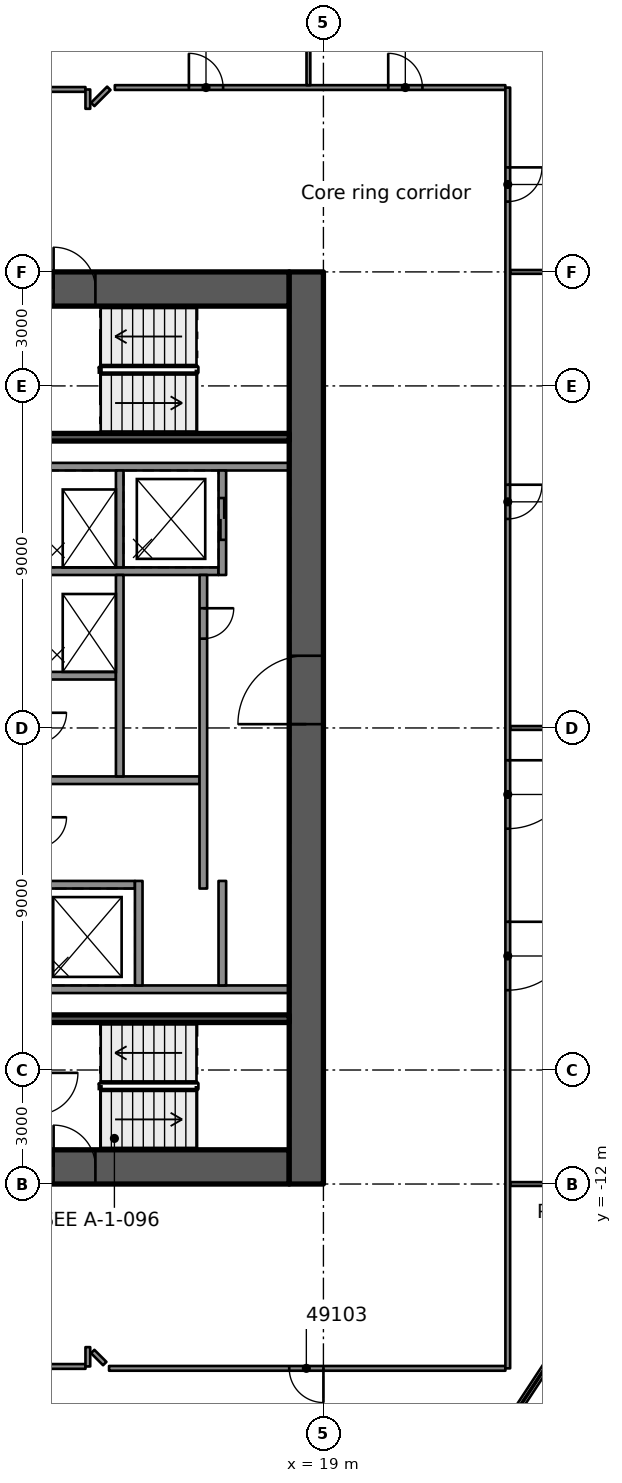
"""IFC4 building model, lengths in metres.
Left out: names, types, materials, properties, quantities, classifications, styles, units other than length and angle.
Written with IfcOpenShell. Run it as: python <this file> out.ifc"""

import sys

from ifc_helpers import new_model, si_unit, direction, frame, frame_2d, origin, place, context, subcontext, project, spatial, rectangle, extrude, element, fill, save


model = new_model("IFC4")
c1 = context("Model", 3, precision=1e-05, world=origin(), true_north=direction((0.0, 1.0)))
c2 = subcontext(c1, "Body", "Model", "MODEL_VIEW")
j1 = project(units=[si_unit("LENGTHUNIT", "METRE"), si_unit("PLANEANGLEUNIT", "RADIAN")], contexts=[c1])
p1 = place(None, origin())
s1 = spatial("IfcSite", under=j1, at=p1, CompositionType="ELEMENT")
p2 = place(p1, origin())
s2 = spatial("IfcBuilding", under=s1, at=p2, CompositionType="ELEMENT")
p3 = place(p2, frame((0.0, 0.0, 246.0)))
s3 = spatial("IfcBuildingStorey", under=s2, at=p3, CompositionType="ELEMENT", Elevation=246.0)
p4 = place(p3, frame((8.9, 11.55, 0.0), z_axis=(0.0, 0.0, 1.0), x_axis=(1.0, 0.0, 0.0)))
e1 = element("IfcWall", 1, at=p4, inside=s3, PredefinedType="SHEAR", context=c2, shape_type="SweptSolid", body=[
    extrude(rectangle(XDim=9.2, YDim=0.9, at=frame_2d((4.6, 0.0))), origin(), (0.0, 0.0, 1.0), 3.5),
])
p5 = place(p4, frame((3.0, 0.0, 0.0)))
e2 = element("IfcOpeningElement", 2, at=p5, cuts=e1, PredefinedType="OPENING", context=c2, shape_type="SweptSolid", body=[
    extrude(rectangle(XDim=1.1, YDim=2.1, at=frame_2d((0.55, 1.05))), frame((0.0, 0.46, 0.0), z_axis=(0.0, -1.0, 0.0), x_axis=(1.0, 0.0, 0.0)), (0.0, 0.0, 1.0), 0.92),
])
p6 = place(p4, frame((0.77, 0.0, 0.0)))
e3 = element("IfcOpeningElement", 3, at=p6, cuts=e1, PredefinedType="OPENING", context=c2, shape_type="SweptSolid", body=[
    extrude(rectangle(XDim=0.9, YDim=2.1, at=frame_2d((0.45, 1.05))), frame((0.0, 0.46, 0.0), z_axis=(0.0, -1.0, 0.0), x_axis=(1.0, 0.0, 0.0)), (0.0, 0.0, 1.0), 0.92),
])
p7 = place(p3, frame((8.9, -11.55, 0.0), z_axis=(0.0, 0.0, 1.0), x_axis=(1.0, 0.0, 0.0)))
e4 = element("IfcWall", 4, at=p7, inside=s3, PredefinedType="SHEAR", context=c2, shape_type="SweptSolid", body=[
    extrude(rectangle(XDim=9.2, YDim=0.9, at=frame_2d((4.6, 0.0))), origin(), (0.0, 0.0, 1.0), 3.5),
])
p8 = place(p7, frame((3.0, 0.0, 0.0)))
e5 = element("IfcOpeningElement", 5, at=p8, cuts=e4, PredefinedType="OPENING", context=c2, shape_type="SweptSolid", body=[
    extrude(rectangle(XDim=1.1, YDim=2.1, at=frame_2d((0.55, 1.05))), frame((0.0, 0.46, 0.0), z_axis=(0.0, -1.0, 0.0), x_axis=(1.0, 0.0, 0.0)), (0.0, 0.0, 1.0), 0.92),
])
p9 = place(p3, frame((18.55, -12.0, 0.0), z_axis=(0.0, 0.0, 1.0), x_axis=(0.0, 1.0, 0.0)))
e6 = element("IfcWall", 6, at=p9, inside=s3, PredefinedType="SHEAR", context=c2, shape_type="SweptSolid", body=[
    extrude(rectangle(XDim=24.0, YDim=0.9, at=frame_2d((12.0, 0.0))), origin(), (0.0, 0.0, 1.0), 3.5),
])
p10 = place(p9, frame((12.1, 0.0, 0.0)))
e7 = element("IfcOpeningElement", 7, at=p10, cuts=e6, PredefinedType="OPENING", context=c2, shape_type="SweptSolid", body=[
    extrude(rectangle(XDim=1.8, YDim=2.1, at=frame_2d((0.9, 1.05))), frame((0.0, 0.46, 0.0), z_axis=(0.0, -1.0, 0.0), x_axis=(1.0, 0.0, 0.0)), (0.0, 0.0, 1.0), 0.92),
])
for number, where, z_axis, x_axis in (
    (8, (11.54, -6.875, 0.0), (0.0, 0.0, 1.0), (1.0, 0.0, 0.0)),
    (9, (11.54, 6.875, 0.0), (0.0, 0.0, 1.0), (1.0, 0.0, 0.0)),
):
    element("IfcWall", number, at=place(p3, frame(where, z_axis=z_axis, x_axis=x_axis)), inside=s3, PredefinedType="SOLIDWALL", context=c2, shape_type="SweptSolid", body=[
        extrude(rectangle(XDim=6.56, YDim=0.2, at=frame_2d((3.28, 0.0))), origin(), (0.0, 0.0, 1.0), 3.08),
    ])
p11 = place(p3, frame((11.54, 4.125, 0.0), z_axis=(0.0, 0.0, 1.0), x_axis=(1.0, 0.0, 0.0)))
e10 = element("IfcWall", 10, at=p11, inside=s3, PredefinedType="SOLIDWALL", context=c2, shape_type="SweptSolid", body=[
    extrude(rectangle(XDim=4.7, YDim=0.2, at=frame_2d((2.35, 0.0))), origin(), (0.0, 0.0, 1.0), 3.08),
])
p12 = place(p3, frame((11.54, 1.375, 0.0), z_axis=(0.0, 0.0, 1.0), x_axis=(1.0, 0.0, 0.0)))
e11 = element("IfcWall", 11, at=p12, inside=s3, PredefinedType="SOLIDWALL", context=c2, shape_type="SweptSolid", body=[
    extrude(rectangle(XDim=2.0, YDim=0.2, at=frame_2d((1.0, 0.0))), origin(), (0.0, 0.0, 1.0), 3.08),
])
p13 = place(p3, frame((11.54, -1.375, 0.0), z_axis=(0.0, 0.0, 1.0), x_axis=(1.0, 0.0, 0.0)))
e12 = element("IfcWall", 12, at=p13, inside=s3, PredefinedType="SOLIDWALL", context=c2, shape_type="SweptSolid", body=[
    extrude(rectangle(XDim=4.2, YDim=0.2, at=frame_2d((2.1, 0.0))), origin(), (0.0, 0.0, 1.0), 3.08),
])
p14 = place(p3, frame((11.54, -4.125, 0.0), z_axis=(0.0, 0.0, 1.0), x_axis=(1.0, 0.0, 0.0)))
e13 = element("IfcWall", 13, at=p14, inside=s3, PredefinedType="SOLIDWALL", context=c2, shape_type="SweptSolid", body=[
    extrude(rectangle(XDim=2.5, YDim=0.2, at=frame_2d((1.25, 0.0))), origin(), (0.0, 0.0, 1.0), 3.08),
])
p15 = place(p3, frame((13.64, 6.775, 0.0), z_axis=(0.0, 0.0, 1.0), x_axis=(0.0, -1.0, 0.0)))
e14 = element("IfcWall", 14, at=p15, inside=s3, PredefinedType="SOLIDWALL", context=c2, shape_type="SweptSolid", body=[
    extrude(rectangle(XDim=2.55, YDim=0.2, at=frame_2d((1.275, 0.0))), origin(), (0.0, 0.0, 1.0), 3.08),
])
p16 = place(p3, frame((13.64, 4.025, 0.0), z_axis=(0.0, 0.0, 1.0), x_axis=(0.0, -1.0, 0.0)))
e15 = element("IfcWall", 15, at=p16, inside=s3, PredefinedType="SOLIDWALL", context=c2, shape_type="SweptSolid", body=[
    extrude(rectangle(XDim=5.3, YDim=0.2, at=frame_2d((2.65, 0.0))), origin(), (0.0, 0.0, 1.0), 3.08),
])
p17 = place(p3, frame((14.14, -4.025, 0.0), z_axis=(0.0, 0.0, 1.0), x_axis=(0.0, -1.0, 0.0)))
e16 = element("IfcWall", 16, at=p17, inside=s3, PredefinedType="SOLIDWALL", context=c2, shape_type="SweptSolid", body=[
    extrude(rectangle(XDim=2.75, YDim=0.2, at=frame_2d((1.375, 0.0))), origin(), (0.0, 0.0, 1.0), 3.08),
])
p18 = place(p3, frame((16.34, 6.775, 0.0), z_axis=(0.0, 0.0, 1.0), x_axis=(0.0, -1.0, 0.0)))
e17 = element("IfcWall", 17, at=p18, inside=s3, PredefinedType="SOLIDWALL", context=c2, shape_type="SweptSolid", body=[
    extrude(rectangle(XDim=2.75, YDim=0.2, at=frame_2d((1.375, 0.0))), origin(), (0.0, 0.0, 1.0), 3.08),
])
p19 = place(p18, frame((0.725, 0.0, 0.0)))
e18 = element("IfcOpeningElement", 18, at=p19, cuts=e17, PredefinedType="OPENING", context=c2, shape_type="SweptSolid", body=[
    extrude(rectangle(XDim=1.1, YDim=2.1, at=frame_2d((0.55, 1.05))), frame((0.0, 0.11, 0.0), z_axis=(0.0, -1.0, 0.0), x_axis=(1.0, 0.0, 0.0)), (0.0, 0.0, 1.0), 0.22),
])
p20 = place(p3, frame((15.84, 4.025, 0.0), z_axis=(0.0, 0.0, 1.0), x_axis=(0.0, -1.0, 0.0)))
e19 = element("IfcWall", 19, at=p20, inside=s3, PredefinedType="SOLIDWALL", context=c2, shape_type="SweptSolid", body=[
    extrude(rectangle(XDim=8.25, YDim=0.2, at=frame_2d((4.125, 0.0))), origin(), (0.0, 0.0, 1.0), 3.08),
])
p21 = place(p20, frame((0.875, 0.0, 0.0)))
e20 = element("IfcOpeningElement", 20, at=p21, cuts=e19, PredefinedType="OPENING", context=c2, shape_type="SweptSolid", body=[
    extrude(rectangle(XDim=0.8, YDim=2.1, at=frame_2d((0.4, 1.05))), frame((0.0, 0.11, 0.0), z_axis=(0.0, -1.0, 0.0), x_axis=(1.0, 0.0, 0.0)), (0.0, 0.0, 1.0), 0.22),
])
p22 = place(p3, frame((16.34, -4.025, 0.0), z_axis=(0.0, 0.0, 1.0), x_axis=(0.0, -1.0, 0.0)))
e21 = element("IfcWall", 21, at=p22, inside=s3, PredefinedType="SOLIDWALL", context=c2, shape_type="SweptSolid", body=[
    extrude(rectangle(XDim=2.75, YDim=0.2, at=frame_2d((1.375, 0.0))), origin(), (0.0, 0.0, 1.0), 3.08),
])
for number, where, z_axis, x_axis in (
    (22, (11.54, -7.65, 0.0), (0.0, 0.0, 1.0), (1.0, 0.0, 0.0)),
    (23, (11.54, 7.65, 0.0), (0.0, 0.0, 1.0), (1.0, 0.0, 0.0)),
):
    element("IfcWall", number, at=place(p3, frame(where, z_axis=z_axis, x_axis=x_axis)), inside=s3, PredefinedType="SOLIDWALL", context=c2, shape_type="SweptSolid", body=[
        extrude(rectangle(XDim=6.56, YDim=0.2, at=frame_2d((3.28, 0.0))), origin(), (0.0, 0.0, 1.0), 3.08),
    ])
p23 = place(p3, frame((12.929, -16.407, 0.0), z_axis=(0.0, 0.0, 1.0), x_axis=(0.707106781187, -0.707106781187, 0.0)))
e24 = element("IfcWall", 24, at=p23, inside=s3, PredefinedType="PARTITIONING", context=c2, shape_type="SweptSolid", body=[
    extrude(rectangle(XDim=0.448, YDim=0.125, at=frame_2d((0.224, 0.0))), origin(), (0.0, 0.0, 1.0), 3.06),
])
p24 = place(p3, frame((23.788, -16.85, 0.0), z_axis=(0.0, 0.0, 1.0), x_axis=(-1.0, 0.0, 0.0)))
e25 = element("IfcWall", 25, at=p24, inside=s3, PredefinedType="PARTITIONING", context=c2, shape_type="SweptSolid", body=[
    extrude(rectangle(XDim=10.429, YDim=0.125, at=frame_2d((5.215, 0.0))), origin(), (0.0, 0.0, 1.0), 3.06),
])
p25 = place(p24, frame((4.788, 0.0, 0.0)))
e26 = element("IfcOpeningElement", 26, at=p25, cuts=e25, PredefinedType="OPENING", context=c2, shape_type="SweptSolid", body=[
    extrude(rectangle(XDim=0.9, YDim=2.1, at=frame_2d((0.45, 1.05))), frame((0.0, 0.073, 0.0), z_axis=(0.0, -1.0, 0.0), x_axis=(1.0, 0.0, 0.0)), (0.0, 0.0, 1.0), 0.145),
])
p26 = place(p3, frame((12.739, -16.8, 0.0), z_axis=(0.0, 0.0, 1.0), x_axis=(-1.0, 0.0, 0.0)))
e27 = element("IfcWall", 27, at=p26, inside=s3, PredefinedType="PARTITIONING", context=c2, shape_type="SweptSolid", body=[
    extrude(rectangle(XDim=25.478, YDim=0.125, at=frame_2d((12.739, 0.0))), origin(), (0.0, 0.0, 1.0), 3.06),
])
p27 = place(p26, frame((15.088, 0.0, 0.0)))
e28 = element("IfcOpeningElement", 28, at=p27, cuts=e27, PredefinedType="OPENING", context=c2, shape_type="SweptSolid", body=[
    extrude(rectangle(XDim=1.8, YDim=2.1, at=frame_2d((0.9, 1.05))), frame((0.0, 0.073, 0.0), z_axis=(0.0, -1.0, 0.0), x_axis=(1.0, 0.0, 0.0)), (0.0, 0.0, 1.0), 0.145),
])
p28 = place(p26, frame((9.189, 0.0, 0.0)))
e29 = element("IfcOpeningElement", 29, at=p28, cuts=e27, PredefinedType="OPENING", context=c2, shape_type="SweptSolid", body=[
    extrude(rectangle(XDim=0.9, YDim=2.1, at=frame_2d((0.45, 1.05))), frame((0.0, 0.073, 0.0), z_axis=(0.0, -1.0, 0.0), x_axis=(1.0, 0.0, 0.0)), (0.0, 0.0, 1.0), 0.145),
])
p29 = place(p3, frame((23.913, -12.0, 0.0), z_axis=(0.0, 0.0, 1.0), x_axis=(1.0, 0.0, 0.0)))
e30 = element("IfcWall", 30, at=p29, inside=s3, PredefinedType="PARTITIONING", context=c2, shape_type="SweptSolid", body=[
    extrude(rectangle(XDim=4.4, YDim=0.1, at=frame_2d((2.2, 0.0))), origin(), (0.0, 0.0, 1.0), 3.06),
])
p30 = place(p3, frame((23.913, 0.0, 0.0), z_axis=(0.0, 0.0, 1.0), x_axis=(1.0, 0.0, 0.0)))
e31 = element("IfcWall", 31, at=p30, inside=s3, PredefinedType="PARTITIONING", context=c2, shape_type="SweptSolid", body=[
    extrude(rectangle(XDim=18.511, YDim=0.1, at=frame_2d((9.255, 0.0))), origin(), (0.0, 0.0, 1.0), 3.06),
])
p31 = place(p3, frame((23.913, 12.0, 0.0), z_axis=(0.0, 0.0, 1.0), x_axis=(1.0, 0.0, 0.0)))
e32 = element("IfcWall", 32, at=p31, inside=s3, PredefinedType="PARTITIONING", context=c2, shape_type="SweptSolid", body=[
    extrude(rectangle(XDim=15.057, YDim=0.1, at=frame_2d((7.528, 0.0))), origin(), (0.0, 0.0, 1.0), 3.06),
])
p32 = place(p3, frame((-12.738, 16.801, 0.0), z_axis=(0.0, 0.0, 1.0), x_axis=(1.0, 0.0, 0.0)))
e33 = element("IfcWall", 33, at=p32, inside=s3, PredefinedType="PARTITIONING", context=c2, shape_type="SweptSolid", body=[
    extrude(rectangle(XDim=25.476, YDim=0.125, at=frame_2d((12.738, 0.0))), origin(), (0.0, 0.0, 1.0), 3.06),
])
p33 = place(p32, frame((15.337, 0.0, 0.0)))
e34 = element("IfcOpeningElement", 34, at=p33, cuts=e33, PredefinedType="OPENING", context=c2, shape_type="SweptSolid", body=[
    extrude(rectangle(XDim=1.1, YDim=2.1, at=frame_2d((0.55, 1.05))), frame((0.0, 0.073, 0.0), z_axis=(0.0, -1.0, 0.0), x_axis=(1.0, 0.0, 0.0)), (0.0, 0.0, 1.0), 0.145),
])
p34 = place(p32, frame((8.938, 0.0, 0.0)))
e35 = element("IfcOpeningElement", 35, at=p34, cuts=e33, PredefinedType="OPENING", context=c2, shape_type="SweptSolid", body=[
    extrude(rectangle(XDim=1.1, YDim=2.1, at=frame_2d((0.55, 1.05))), frame((0.0, 0.073, 0.0), z_axis=(0.0, -1.0, 0.0), x_axis=(1.0, 0.0, 0.0)), (0.0, 0.0, 1.0), 0.145),
])
p35 = place(p3, frame((13.511, 16.851, 0.0), z_axis=(0.0, 0.0, 1.0), x_axis=(1.0, 0.0, 0.0)))
e36 = element("IfcWall", 36, at=p35, inside=s3, PredefinedType="PARTITIONING", context=c2, shape_type="SweptSolid", body=[
    extrude(rectangle(XDim=10.276, YDim=0.125, at=frame_2d((5.138, 0.0))), origin(), (0.0, 0.0, 1.0), 3.06),
])
p36 = place(p35, frame((7.194, 0.0, 0.0)))
e37 = element("IfcOpeningElement", 37, at=p36, cuts=e36, PredefinedType="OPENING", context=c2, shape_type="SweptSolid", body=[
    extrude(rectangle(XDim=0.9, YDim=2.1, at=frame_2d((0.45, 1.05))), frame((0.0, 0.073, 0.0), z_axis=(0.0, -1.0, 0.0), x_axis=(1.0, 0.0, 0.0)), (0.0, 0.0, 1.0), 0.145),
])
p37 = place(p35, frame((1.949, 0.0, 0.0)))
e38 = element("IfcOpeningElement", 38, at=p37, cuts=e36, PredefinedType="OPENING", context=c2, shape_type="SweptSolid", body=[
    extrude(rectangle(XDim=0.9, YDim=2.1, at=frame_2d((0.45, 1.05))), frame((0.0, 0.073, 0.0), z_axis=(0.0, -1.0, 0.0), x_axis=(1.0, 0.0, 0.0)), (0.0, 0.0, 1.0), 0.145),
])
p38 = place(p3, frame((12.929, 16.407, 0.0), z_axis=(0.0, 0.0, 1.0), x_axis=(0.707106781187, 0.707106781187, 0.0)))
e39 = element("IfcWall", 39, at=p38, inside=s3, PredefinedType="PARTITIONING", context=c2, shape_type="SweptSolid", body=[
    extrude(rectangle(XDim=0.6, YDim=0.125, at=frame_2d((0.3, 0.0))), origin(), (0.0, 0.0, 1.0), 3.06),
])
p39 = place(p3, frame((23.851, 16.85, 0.0), z_axis=(0.0, 0.0, 1.0), x_axis=(0.0, -1.0, 0.0)))
e40 = element("IfcWall", 40, at=p39, inside=s3, PredefinedType="PARTITIONING", context=c2, shape_type="SweptSolid", body=[
    extrude(rectangle(XDim=33.7, YDim=0.125, at=frame_2d((16.85, 0.0))), origin(), (0.0, 0.0, 1.0), 3.06),
])
p40 = place(p39, frame((21.95, 0.0, 0.0)))
e41 = element("IfcOpeningElement", 41, at=p40, cuts=e40, PredefinedType="OPENING", context=c2, shape_type="SweptSolid", body=[
    extrude(rectangle(XDim=1.8, YDim=2.1, at=frame_2d((0.9, 1.05))), frame((0.0, 0.073, 0.0), z_axis=(0.0, -1.0, 0.0), x_axis=(1.0, 0.0, 0.0)), (0.0, 0.0, 1.0), 0.145),
])
p41 = place(p39, frame((17.7, 0.0, 0.0)))
e42 = element("IfcOpeningElement", 42, at=p41, cuts=e40, PredefinedType="OPENING", context=c2, shape_type="SweptSolid", body=[
    extrude(rectangle(XDim=1.8, YDim=2.1, at=frame_2d((0.9, 1.05))), frame((0.0, 0.073, 0.0), z_axis=(0.0, -1.0, 0.0), x_axis=(1.0, 0.0, 0.0)), (0.0, 0.0, 1.0), 0.145),
])
p42 = place(p39, frame((10.45, 0.0, 0.0)))
e43 = element("IfcOpeningElement", 43, at=p42, cuts=e40, PredefinedType="OPENING", context=c2, shape_type="SweptSolid", body=[
    extrude(rectangle(XDim=0.9, YDim=2.1, at=frame_2d((0.45, 1.05))), frame((0.0, 0.073, 0.0), z_axis=(0.0, -1.0, 0.0), x_axis=(1.0, 0.0, 0.0)), (0.0, 0.0, 1.0), 0.145),
])
p43 = place(p39, frame((2.1, 0.0, 0.0)))
e44 = element("IfcOpeningElement", 44, at=p43, cuts=e40, PredefinedType="OPENING", context=c2, shape_type="SweptSolid", body=[
    extrude(rectangle(XDim=0.9, YDim=2.1, at=frame_2d((0.45, 1.05))), frame((0.0, 0.073, 0.0), z_axis=(0.0, -1.0, 0.0), x_axis=(1.0, 0.0, 0.0)), (0.0, 0.0, 1.0), 0.145),
])
p44 = place(p3, frame((18.605, 16.913, 0.0), z_axis=(0.0, 0.0, 1.0), x_axis=(0.0, 1.0, 0.0)))
e45 = element("IfcWall", 45, at=p44, inside=s3, PredefinedType="PARTITIONING", context=c2, shape_type="SweptSolid", body=[
    extrude(rectangle(XDim=10.992, YDim=0.1, at=frame_2d((5.496, 0.0))), origin(), (0.0, 0.0, 1.0), 3.06),
])
for number, where, z_axis, x_axis in (
    (46, (12.801, -16.8, 0.0), (0.0, 0.0, 1.0), (0.0, 1.0, 0.0)),
    (47, (12.801, 16.292, 0.0), (0.0, 0.0, 1.0), (0.0, 1.0, 0.0)),
):
    element("IfcWall", number, at=place(p3, frame(where, z_axis=z_axis, x_axis=x_axis)), inside=s3, PredefinedType="PARTITIONING", context=c2, shape_type="SweptSolid", body=[
        extrude(rectangle(XDim=0.508, YDim=0.125, at=frame_2d((0.254, 0.0))), origin(), (0.0, 0.0, 1.0), 3.06),
    ])
p45 = place(p19, origin())
e48 = element("IfcDoor", 48, at=p45, inside=s3, OperationType="DOUBLE_DOOR_SLIDING", PredefinedType="DOOR", context=c2, shape_type="SweptSolid", body=[
    extrude(rectangle(XDim=1.1, YDim=2.1, at=frame_2d((0.55, 1.05))), frame((0.0, 0.025, 0.0), z_axis=(0.0, -1.0, 0.0), x_axis=(1.0, 0.0, 0.0)), (0.0, 0.0, 1.0), 0.05),
])
fill(e18, e48)
p46 = place(p21, origin())
e49 = element("IfcDoor", 49, at=p46, inside=s3, OperationType="SINGLE_SWING_LEFT", PredefinedType="DOOR", context=c2, shape_type="SweptSolid", body=[
    extrude(rectangle(XDim=0.8, YDim=2.1, at=frame_2d((0.4, 1.05))), frame((0.0, 0.025, 0.0), z_axis=(0.0, -1.0, 0.0), x_axis=(1.0, 0.0, 0.0)), (0.0, 0.0, 1.0), 0.05),
])
fill(e20, e49)
p47 = place(p10, origin())
e50 = element("IfcDoor", 50, at=p47, inside=s3, OperationType="SINGLE_SWING_RIGHT", PredefinedType="DOOR", context=c2, shape_type="SweptSolid", body=[
    extrude(rectangle(XDim=1.8, YDim=2.1, at=frame_2d((0.9, 1.05))), frame((0.0, 0.025, 0.0), z_axis=(0.0, -1.0, 0.0), x_axis=(1.0, 0.0, 0.0)), (0.0, 0.0, 1.0), 0.05),
])
fill(e7, e50)
p48 = place(p8, origin())
e51 = element("IfcDoor", 51, at=p48, inside=s3, OperationType="SINGLE_SWING_LEFT", PredefinedType="DOOR", context=c2, shape_type="SweptSolid", body=[
    extrude(rectangle(XDim=1.1, YDim=2.1, at=frame_2d((0.55, 1.05))), frame((0.0, 0.025, 0.0), z_axis=(0.0, -1.0, 0.0), x_axis=(1.0, 0.0, 0.0)), (0.0, 0.0, 1.0), 0.05),
])
fill(e5, e51)
p49 = place(p5, origin())
e52 = element("IfcDoor", 52, at=p49, inside=s3, OperationType="SINGLE_SWING_LEFT", PredefinedType="DOOR", context=c2, shape_type="SweptSolid", body=[
    extrude(rectangle(XDim=1.1, YDim=2.1, at=frame_2d((0.55, 1.05))), frame((0.0, 0.025, 0.0), z_axis=(0.0, -1.0, 0.0), x_axis=(1.0, 0.0, 0.0)), (0.0, 0.0, 1.0), 0.05),
])
fill(e2, e52)
p50 = place(p25, origin())
e53 = element("IfcDoor", 53, at=p50, inside=s3, OperationType="SINGLE_SWING_RIGHT", PredefinedType="DOOR", context=c2, shape_type="SweptSolid", body=[
    extrude(rectangle(XDim=0.9, YDim=2.1, at=frame_2d((0.45, 1.05))), frame((0.0, 0.025, 0.0), z_axis=(0.0, -1.0, 0.0), x_axis=(1.0, 0.0, 0.0)), (0.0, 0.0, 1.0), 0.05),
])
fill(e26, e53)
p51 = place(p40, origin())
e54 = element("IfcDoor", 54, at=p51, inside=s3, OperationType="DOUBLE_DOOR_SINGLE_SWING", PredefinedType="DOOR", context=c2, shape_type="SweptSolid", body=[
    extrude(rectangle(XDim=1.8, YDim=2.1, at=frame_2d((0.9, 1.05))), frame((0.0, 0.025, 0.0), z_axis=(0.0, -1.0, 0.0), x_axis=(1.0, 0.0, 0.0)), (0.0, 0.0, 1.0), 0.05),
])
fill(e41, e54)
p52 = place(p41, origin())
e55 = element("IfcDoor", 55, at=p52, inside=s3, OperationType="DOUBLE_DOOR_SINGLE_SWING", PredefinedType="DOOR", context=c2, shape_type="SweptSolid", body=[
    extrude(rectangle(XDim=1.8, YDim=2.1, at=frame_2d((0.9, 1.05))), frame((0.0, 0.025, 0.0), z_axis=(0.0, -1.0, 0.0), x_axis=(1.0, 0.0, 0.0)), (0.0, 0.0, 1.0), 0.05),
])
fill(e42, e55)
p53 = place(p42, origin())
e56 = element("IfcDoor", 56, at=p53, inside=s3, OperationType="SINGLE_SWING_LEFT", PredefinedType="DOOR", context=c2, shape_type="SweptSolid", body=[
    extrude(rectangle(XDim=0.9, YDim=2.1, at=frame_2d((0.45, 1.05))), frame((0.0, 0.025, 0.0), z_axis=(0.0, -1.0, 0.0), x_axis=(1.0, 0.0, 0.0)), (0.0, 0.0, 1.0), 0.05),
])
fill(e43, e56)
p54 = place(p36, origin())
e57 = element("IfcDoor", 57, at=p54, inside=s3, OperationType="SINGLE_SWING_RIGHT", PredefinedType="DOOR", context=c2, shape_type="SweptSolid", body=[
    extrude(rectangle(XDim=0.9, YDim=2.1, at=frame_2d((0.45, 1.05))), frame((0.0, 0.025, 0.0), z_axis=(0.0, -1.0, 0.0), x_axis=(1.0, 0.0, 0.0)), (0.0, 0.0, 1.0), 0.05),
])
fill(e37, e57)
p55 = place(p43, origin())
e58 = element("IfcDoor", 58, at=p55, inside=s3, OperationType="SINGLE_SWING_LEFT", PredefinedType="DOOR", context=c2, shape_type="SweptSolid", body=[
    extrude(rectangle(XDim=0.9, YDim=2.1, at=frame_2d((0.45, 1.05))), frame((0.0, 0.025, 0.0), z_axis=(0.0, -1.0, 0.0), x_axis=(1.0, 0.0, 0.0)), (0.0, 0.0, 1.0), 0.05),
])
fill(e44, e58)
p56 = place(p37, origin())
e59 = element("IfcDoor", 59, at=p56, inside=s3, OperationType="SINGLE_SWING_LEFT", PredefinedType="DOOR", context=c2, shape_type="SweptSolid", body=[
    extrude(rectangle(XDim=0.9, YDim=2.1, at=frame_2d((0.45, 1.05))), frame((0.0, 0.025, 0.0), z_axis=(0.0, -1.0, 0.0), x_axis=(1.0, 0.0, 0.0)), (0.0, 0.0, 1.0), 0.05),
])
fill(e38, e59)
save(model, sys.argv[1])
